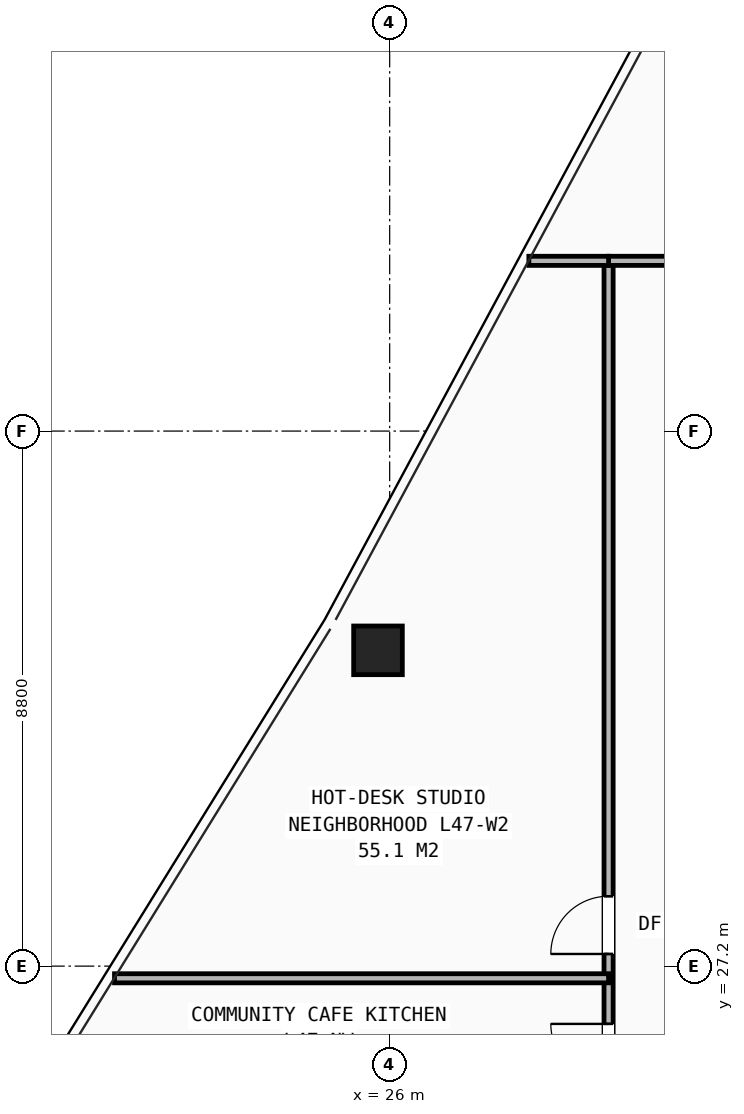
"""IFC4 building model, lengths in metres.
Left out: names, types, materials, properties, quantities, classifications, styles, units other than length and angle.
Written with IfcOpenShell. Run it as: python <this file> out.ifc"""

import sys

from ifc_helpers import new_model, si_unit, direction, frame, frame_2d, origin, origin_2d, place, context, subcontext, project, spatial, rectangle, hollow_rectangle, extrude, element, fill, save


model = new_model("IFC4")
c1 = context("Model", 3, precision=1e-05, world=origin(), true_north=direction((0.0, 1.0)))
c2 = subcontext(c1, "Body", "Model", "MODEL_VIEW")
j1 = project(units=[si_unit("LENGTHUNIT", "METRE"), si_unit("PLANEANGLEUNIT", "RADIAN")], contexts=[c1])
p1 = place(None, origin())
s1 = spatial("IfcSite", under=j1, at=p1, CompositionType="ELEMENT")
p2 = place(p1, origin())
s2 = spatial("IfcBuilding", under=s1, at=p2, CompositionType="ELEMENT")
p3 = place(p2, frame((0.0, 0.0, 165.45)))
s3 = spatial("IfcBuildingStorey", under=s2, at=p3, CompositionType="ELEMENT", Elevation=165.45)
p4 = place(p3, frame((25.808, 32.394, 0.0), z_axis=(0.0, 0.0, 1.0), x_axis=(1.0, 0.0, 0.0)))
e1 = element("IfcColumn", 1, at=p4, inside=s3, PredefinedType="COLUMN", context=c2, shape_type="SweptSolid", body=[
    extrude(hollow_rectangle(XDim=0.8, YDim=0.8, WallThickness=0.055, at=origin_2d()), origin(), (0.0, 0.0, 1.0), 3.45),
])
p5 = place(p3, frame((29.6, 24.9, 0.0), z_axis=(0.0, 0.0, 1.0), x_axis=(0.0, 1.0, 0.0)))
e2 = element("IfcWall", 2, at=p5, inside=s3, PredefinedType="PARTITIONING", context=c2, shape_type="SweptSolid", body=[
    extrude(rectangle(XDim=13.9, YDim=0.15, at=frame_2d((6.95, 0.0))), origin(), (0.0, 0.0, 1.0), 2.252),
])
p6 = place(p5, frame((0.4, 0.0, 0.0)))
e3 = element("IfcOpeningElement", 3, at=p6, cuts=e2, PredefinedType="OPENING", context=c2, shape_type="SweptSolid", body=[
    extrude(rectangle(XDim=0.95, YDim=2.1, at=frame_2d((0.475, 1.05))), frame((0.0, 0.085, 0.0), z_axis=(0.0, -1.0, 0.0), x_axis=(1.0, 0.0, 0.0)), (0.0, 0.0, 1.0), 0.17),
])
p7 = place(p5, frame((2.5, 0.0, 0.0)))
e4 = element("IfcOpeningElement", 4, at=p7, cuts=e2, PredefinedType="OPENING", context=c2, shape_type="SweptSolid", body=[
    extrude(rectangle(XDim=0.95, YDim=2.1, at=frame_2d((0.475, 1.05))), frame((0.0, 0.085, 0.0), z_axis=(0.0, -1.0, 0.0), x_axis=(1.0, 0.0, 0.0)), (0.0, 0.0, 1.0), 0.17),
])
p8 = place(p3, frame((29.6, 38.8, 0.0), z_axis=(0.0, 0.0, 1.0), x_axis=(1.0, 0.0, 0.0)))
e5 = element("IfcWall", 5, at=p8, inside=s3, PredefinedType="PARTITIONING", context=c2, shape_type="SweptSolid", body=[
    extrude(rectangle(XDim=2.2, YDim=0.15, at=frame_2d((1.1, 0.0))), origin(), (0.0, 0.0, 1.0), 2.589),
])
p9 = place(p3, frame((28.289, 38.8, 0.0), z_axis=(0.0, 0.0, 1.0), x_axis=(1.0, 0.0, 0.0)))
e6 = element("IfcWall", 6, at=p9, inside=s3, PredefinedType="PARTITIONING", context=c2, shape_type="SweptSolid", body=[
    extrude(rectangle(XDim=1.311, YDim=0.15, at=frame_2d((0.655, 0.0))), origin(), (0.0, 0.0, 1.0), 2.589),
])
p10 = place(p3, frame((21.475, 27.0, 0.0), z_axis=(0.0, 0.0, 1.0), x_axis=(1.0, 0.0, 0.0)))
e7 = element("IfcWall", 7, at=p10, inside=s3, PredefinedType="PARTITIONING", context=c2, shape_type="SweptSolid", body=[
    extrude(rectangle(XDim=8.125, YDim=0.15, at=frame_2d((4.063, 0.0))), origin(), (0.0, 0.0, 1.0), 2.589),
])
p11 = place(p6, origin())
e8 = element("IfcDoor", 8, at=p11, inside=s3, OperationType="SINGLE_SWING_RIGHT", PredefinedType="DOOR", context=c2, shape_type="SweptSolid", body=[
    extrude(rectangle(XDim=0.95, YDim=2.1, at=frame_2d((0.475, 1.05))), frame((0.0, 0.025, 0.0), z_axis=(0.0, -1.0, 0.0), x_axis=(1.0, 0.0, 0.0)), (0.0, 0.0, 1.0), 0.05),
])
fill(e3, e8)
p12 = place(p7, origin())
e9 = element("IfcDoor", 9, at=p12, inside=s3, OperationType="SINGLE_SWING_LEFT", PredefinedType="DOOR", context=c2, shape_type="SweptSolid", body=[
    extrude(rectangle(XDim=0.95, YDim=2.1, at=frame_2d((0.475, 1.05))), frame((0.0, 0.025, 0.0), z_axis=(0.0, -1.0, 0.0), x_axis=(1.0, 0.0, 0.0)), (0.0, 0.0, 1.0), 0.05),
])
fill(e4, e9)
save(model, sys.argv[1])
